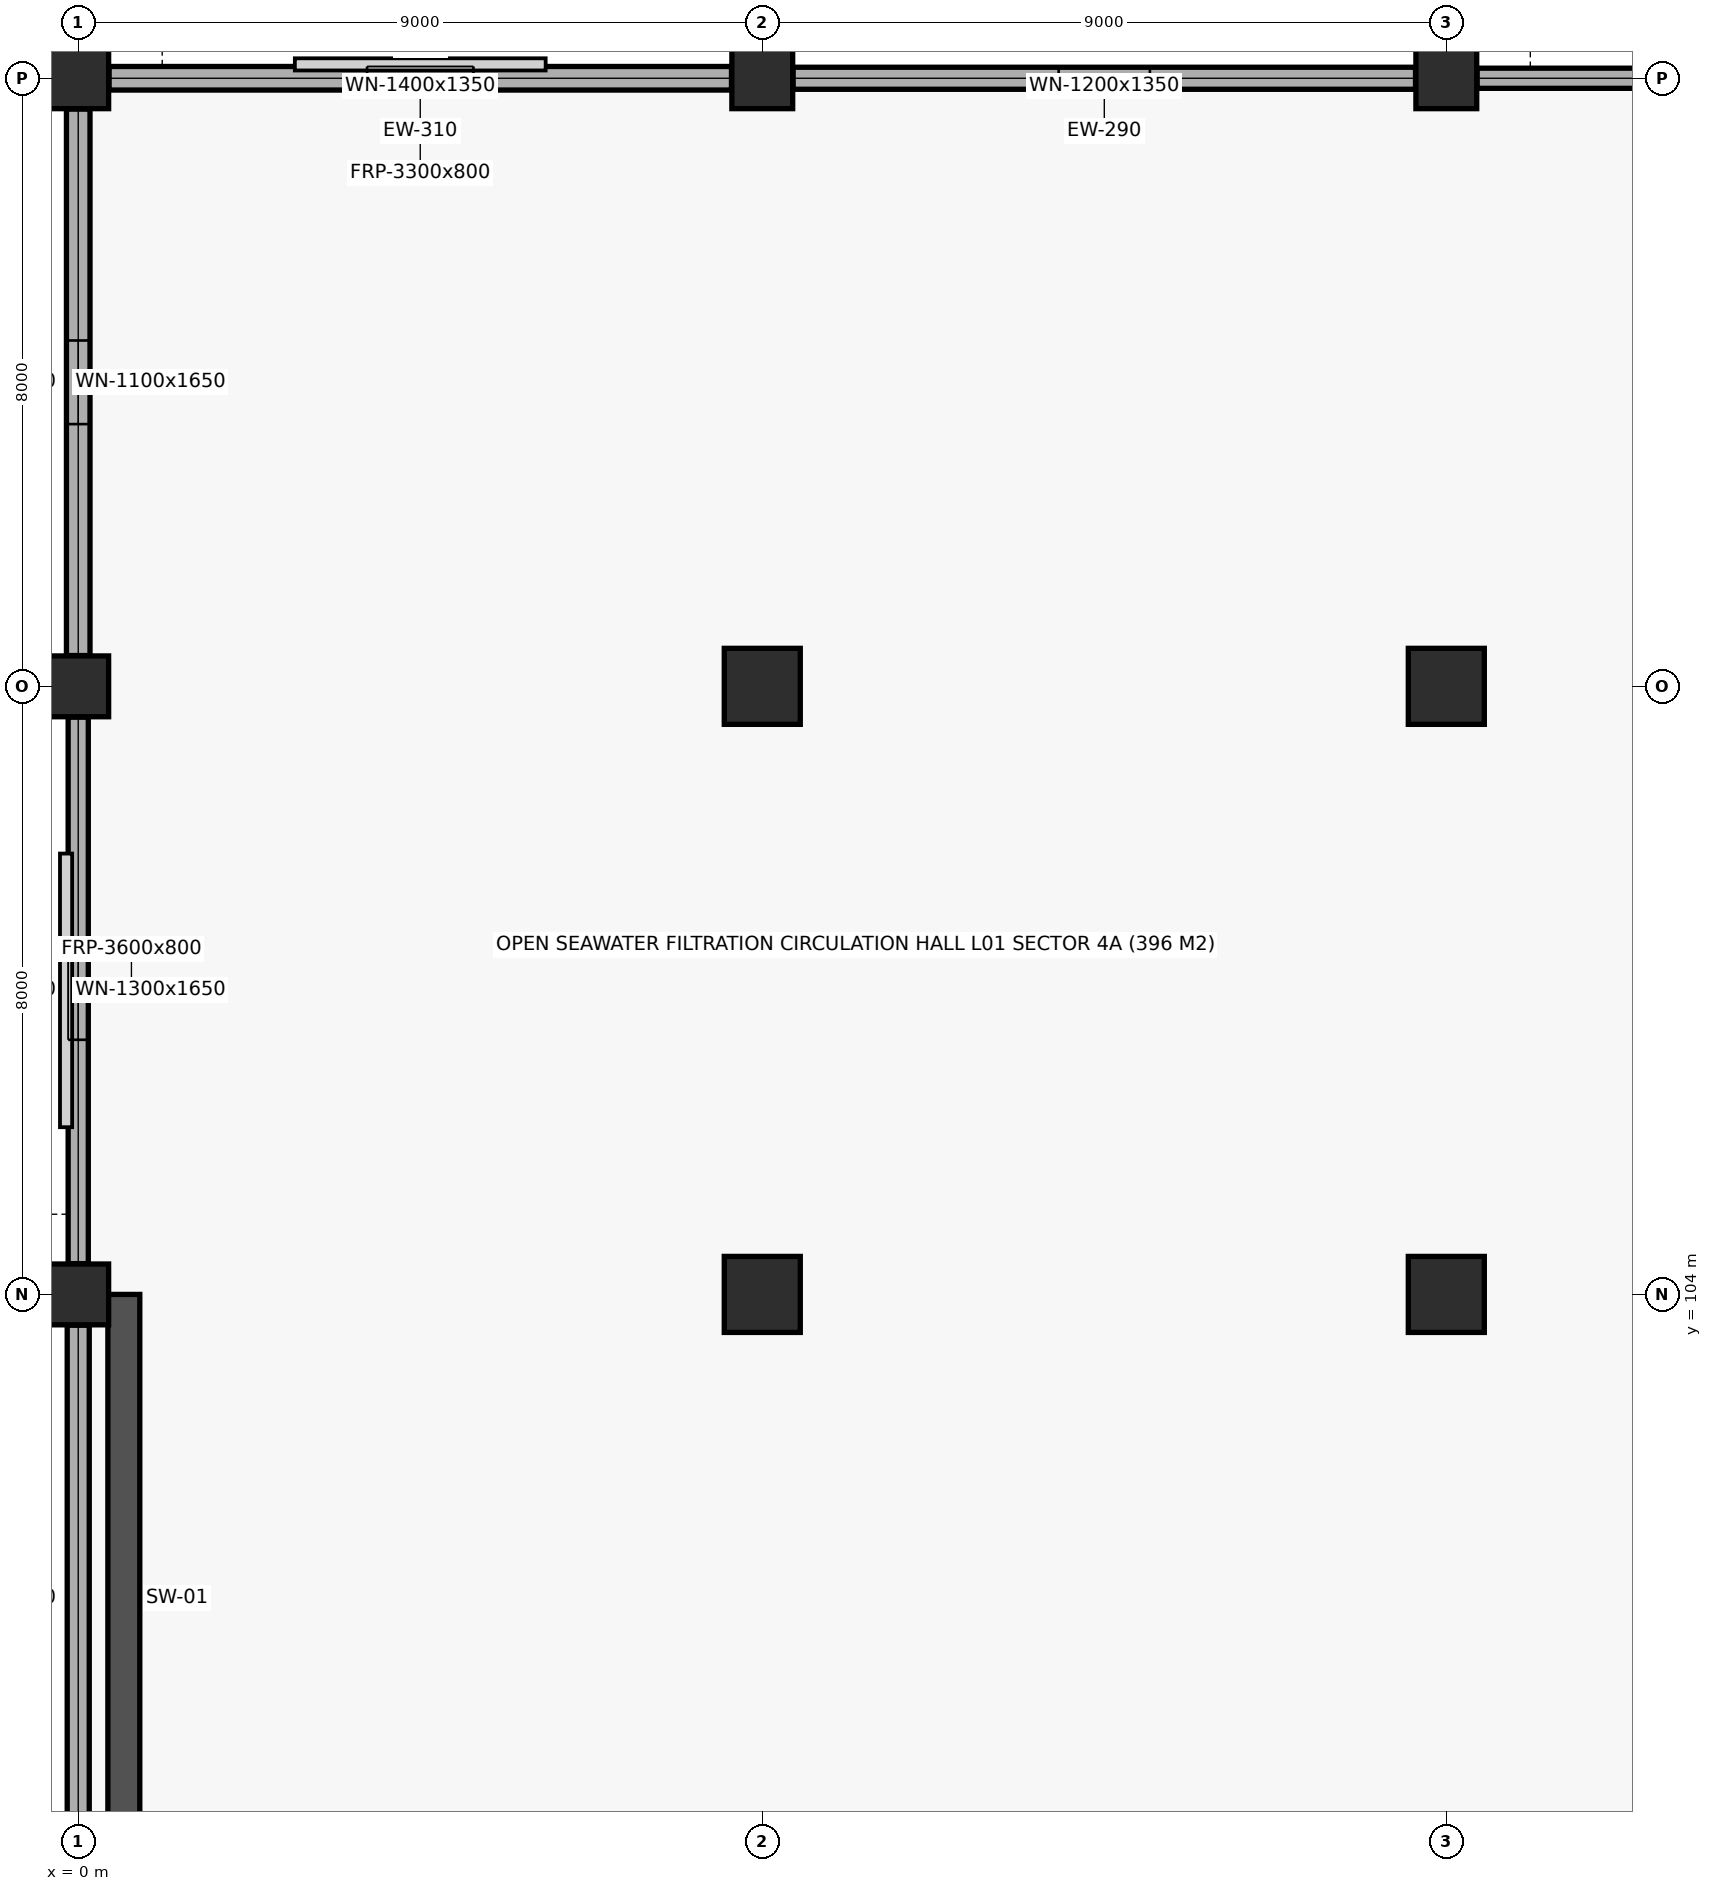
"""IFC4 building model, lengths in metres.
Left out: names, types, materials, properties, quantities, classifications, styles, units other than length and angle.
Written with IfcOpenShell. Run it as: python <this file> out.ifc"""

import sys

from ifc_helpers import new_model, si_unit, direction, frame, frame_2d, origin, origin_2d, place, context, subcontext, project, spatial, rectangle, extrude, element, fill, save


model = new_model("IFC4")
c1 = context("Model", 3, precision=1e-05, world=origin(), true_north=direction((0.0, 1.0)))
c2 = subcontext(c1, "Body", "Model", "MODEL_VIEW")
j1 = project(units=[si_unit("LENGTHUNIT", "METRE"), si_unit("PLANEANGLEUNIT", "RADIAN")], contexts=[c1])
p1 = place(None, origin())
s1 = spatial("IfcSite", under=j1, at=p1, CompositionType="ELEMENT")
p2 = place(p1, origin())
s2 = spatial("IfcBuilding", under=s1, at=p2, CompositionType="ELEMENT")
p3 = place(p2, frame((0.0, 0.0, 4.5)))
s3 = spatial("IfcBuildingStorey", under=s2, at=p3, CompositionType="ELEMENT", Elevation=4.5)
for number, where, z_axis, x_axis in (
    (1, (0.0, 104.0, 0.0), (0.0, 0.0, 1.0), (1.0, 0.0, 0.0)),
    (2, (0.0, 112.0, 0.0), (0.0, 0.0, 1.0), (1.0, 0.0, 0.0)),
    (3, (0.0, 120.0, 0.0), (0.0, 0.0, 1.0), (1.0, 0.0, 0.0)),
):
    element("IfcColumn", number, at=place(p3, frame(where, z_axis=z_axis, x_axis=x_axis)), inside=s3, PredefinedType="COLUMN", context=c2, shape_type="SweptSolid", body=[
        extrude(rectangle(XDim=0.8, YDim=0.8, at=origin_2d()), origin(), (0.0, 0.0, 1.0), 4.5),
    ])
for number, where, z_axis, x_axis in (
    (4, (9.0, 104.0, 0.0), (0.0, 0.0, 1.0), (1.0, 0.0, 0.0)),
    (5, (9.0, 112.0, 0.0), (0.0, 0.0, 1.0), (1.0, 0.0, 0.0)),
):
    element("IfcColumn", number, at=place(p3, frame(where, z_axis=z_axis, x_axis=x_axis)), inside=s3, PredefinedType="COLUMN", context=c2, shape_type="SweptSolid", body=[
        extrude(rectangle(XDim=1.0, YDim=1.0, at=origin_2d()), origin(), (0.0, 0.0, 1.0), 4.5),
    ])
p4 = place(p3, frame((9.0, 120.0, 0.0), z_axis=(0.0, 0.0, 1.0), x_axis=(1.0, 0.0, 0.0)))
e6 = element("IfcColumn", 6, at=p4, inside=s3, PredefinedType="COLUMN", context=c2, shape_type="SweptSolid", body=[
    extrude(rectangle(XDim=0.8, YDim=0.8, at=origin_2d()), origin(), (0.0, 0.0, 1.0), 4.5),
])
for number, where, z_axis, x_axis in (
    (7, (18.0, 104.0, 0.0), (0.0, 0.0, 1.0), (1.0, 0.0, 0.0)),
    (8, (18.0, 112.0, 0.0), (0.0, 0.0, 1.0), (1.0, 0.0, 0.0)),
):
    element("IfcColumn", number, at=place(p3, frame(where, z_axis=z_axis, x_axis=x_axis)), inside=s3, PredefinedType="COLUMN", context=c2, shape_type="SweptSolid", body=[
        extrude(rectangle(XDim=1.0, YDim=1.0, at=origin_2d()), origin(), (0.0, 0.0, 1.0), 4.5),
    ])
p5 = place(p3, frame((18.0, 120.0, 0.0), z_axis=(0.0, 0.0, 1.0), x_axis=(1.0, 0.0, 0.0)))
e9 = element("IfcColumn", 9, at=p5, inside=s3, PredefinedType="COLUMN", context=c2, shape_type="SweptSolid", body=[
    extrude(rectangle(XDim=0.8, YDim=0.8, at=origin_2d()), origin(), (0.0, 0.0, 1.0), 4.5),
])
p6 = place(p3, frame((0.6, 96.0, 0.0), z_axis=(0.0, 0.0, 1.0), x_axis=(0.0, 1.0, 0.0)))
e10 = element("IfcWall", 10, at=p6, inside=s3, PredefinedType="SHEAR", context=c2, shape_type="SweptSolid", body=[
    extrude(rectangle(XDim=8.0, YDim=0.42, at=frame_2d((4.0, 0.0))), origin(), (0.0, 0.0, 1.0), 4.18),
])
p7 = place(p3, frame((0.405, 120.0, 0.0), z_axis=(0.0, 0.0, 1.0), x_axis=(1.0, 0.0, 0.0)))
e11 = element("IfcWall", 11, at=p7, inside=s3, PredefinedType="STANDARD", context=c2, shape_type="SweptSolid", body=[
    extrude(rectangle(XDim=8.19, YDim=0.31, at=frame_2d((4.095, 0.0))), origin(), (0.0, 0.0, 1.0), 3.46),
])
p8 = place(p7, frame((3.395, 0.0, 0.85)))
e12 = element("IfcOpeningElement", 12, at=p8, cuts=e11, PredefinedType="OPENING", context=c2, shape_type="SweptSolid", body=[
    extrude(rectangle(XDim=1.4, YDim=1.35, at=frame_2d((0.7, 0.675))), frame((0.0, 0.167, 0.0), z_axis=(0.0, -1.0, 0.0), x_axis=(1.0, 0.0, 0.0)), (0.0, 0.0, 1.0), 0.334),
])
p9 = place(p3, frame((9.405, 120.0, 0.0), z_axis=(0.0, 0.0, 1.0), x_axis=(1.0, 0.0, 0.0)))
e13 = element("IfcWall", 13, at=p9, inside=s3, PredefinedType="STANDARD", context=c2, shape_type="SweptSolid", body=[
    extrude(rectangle(XDim=8.19, YDim=0.29, at=frame_2d((4.095, 0.0))), origin(), (0.0, 0.0, 1.0), 3.46),
])
p10 = place(p9, frame((3.495, 0.0, 0.85)))
e14 = element("IfcOpeningElement", 14, at=p10, cuts=e13, PredefinedType="OPENING", context=c2, shape_type="SweptSolid", body=[
    extrude(rectangle(XDim=1.2, YDim=1.35, at=frame_2d((0.6, 0.675))), frame((0.0, 0.157, 0.0), z_axis=(0.0, -1.0, 0.0), x_axis=(1.0, 0.0, 0.0)), (0.0, 0.0, 1.0), 0.314),
])
p11 = place(p3, frame((18.405, 120.0, 0.0), z_axis=(0.0, 0.0, 1.0), x_axis=(1.0, 0.0, 0.0)))
e15 = element("IfcWall", 15, at=p11, inside=s3, PredefinedType="STANDARD", context=c2, shape_type="SweptSolid", body=[
    extrude(rectangle(XDim=8.19, YDim=0.265, at=frame_2d((4.095, 0.0))), origin(), (0.0, 0.0, 1.0), 3.46),
])
p12 = place(p11, frame((3.595, 0.0, 0.85)))
e16 = element("IfcOpeningElement", 16, at=p12, cuts=e15, PredefinedType="OPENING", context=c2, shape_type="SweptSolid", body=[
    extrude(rectangle(XDim=1.0, YDim=1.35, at=frame_2d((0.5, 0.675))), frame((0.0, 0.145, 0.0), z_axis=(0.0, -1.0, 0.0), x_axis=(1.0, 0.0, 0.0)), (0.0, 0.0, 1.0), 0.289),
])
p13 = place(p3, frame((0.0, 96.405, 0.0), z_axis=(0.0, 0.0, 1.0), x_axis=(0.0, 1.0, 0.0)))
e17 = element("IfcWall", 17, at=p13, inside=s3, PredefinedType="STANDARD", context=c2, shape_type="SweptSolid", body=[
    extrude(rectangle(XDim=7.19, YDim=0.29, at=frame_2d((3.595, 0.0))), origin(), (0.0, 0.0, 1.0), 3.46),
])
p14 = place(p3, frame((0.0, 104.405, 0.0), z_axis=(0.0, 0.0, 1.0), x_axis=(0.0, 1.0, 0.0)))
e18 = element("IfcWall", 18, at=p14, inside=s3, PredefinedType="STANDARD", context=c2, shape_type="SweptSolid", body=[
    extrude(rectangle(XDim=7.19, YDim=0.265, at=frame_2d((3.595, 0.0))), origin(), (0.0, 0.0, 1.0), 3.46),
])
p15 = place(p14, frame((2.945, 0.0, 0.85)))
e19 = element("IfcOpeningElement", 19, at=p15, cuts=e18, PredefinedType="OPENING", context=c2, shape_type="SweptSolid", body=[
    extrude(rectangle(XDim=1.3, YDim=1.65, at=frame_2d((0.65, 0.825))), frame((0.0, 0.145, 0.0), z_axis=(0.0, -1.0, 0.0), x_axis=(1.0, 0.0, 0.0)), (0.0, 0.0, 1.0), 0.289),
])
p16 = place(p3, frame((0.0, 112.405, 0.0), z_axis=(0.0, 0.0, 1.0), x_axis=(0.0, 1.0, 0.0)))
e20 = element("IfcWall", 20, at=p16, inside=s3, PredefinedType="STANDARD", context=c2, shape_type="SweptSolid", body=[
    extrude(rectangle(XDim=7.19, YDim=0.31, at=frame_2d((3.595, 0.0))), origin(), (0.0, 0.0, 1.0), 3.46),
])
p17 = place(p16, frame((3.045, 0.0, 0.85)))
e21 = element("IfcOpeningElement", 21, at=p17, cuts=e20, PredefinedType="OPENING", context=c2, shape_type="SweptSolid", body=[
    extrude(rectangle(XDim=1.1, YDim=1.65, at=frame_2d((0.55, 0.825))), frame((0.0, 0.167, 0.0), z_axis=(0.0, -1.0, 0.0), x_axis=(1.0, 0.0, 0.0)), (0.0, 0.0, 1.0), 0.334),
])
p18 = place(p8, origin())
e22 = element("IfcWindow", 22, at=p18, inside=s3, PartitioningType="SINGLE_PANEL", PredefinedType="WINDOW", context=c2, shape_type="SweptSolid", body=[
    extrude(rectangle(XDim=1.4, YDim=1.35, at=frame_2d((0.7, 0.675))), frame((0.0, 0.03, 0.0), z_axis=(0.0, -1.0, 0.0), x_axis=(1.0, 0.0, 0.0)), (0.0, 0.0, 1.0), 0.06),
])
fill(e12, e22)
p19 = place(p10, origin())
e23 = element("IfcWindow", 23, at=p19, inside=s3, PartitioningType="SINGLE_PANEL", PredefinedType="WINDOW", context=c2, shape_type="SweptSolid", body=[
    extrude(rectangle(XDim=1.2, YDim=1.35, at=frame_2d((0.6, 0.675))), frame((0.0, 0.03, 0.0), z_axis=(0.0, -1.0, 0.0), x_axis=(1.0, 0.0, 0.0)), (0.0, 0.0, 1.0), 0.06),
])
fill(e14, e23)
p20 = place(p15, origin())
e24 = element("IfcWindow", 24, at=p20, inside=s3, PartitioningType="SINGLE_PANEL", PredefinedType="WINDOW", context=c2, shape_type="SweptSolid", body=[
    extrude(rectangle(XDim=1.3, YDim=1.65, at=frame_2d((0.65, 0.825))), frame((0.0, 0.03, 0.0), z_axis=(0.0, -1.0, 0.0), x_axis=(1.0, 0.0, 0.0)), (0.0, 0.0, 1.0), 0.06),
])
fill(e19, e24)
p21 = place(p17, origin())
e25 = element("IfcWindow", 25, at=p21, inside=s3, PartitioningType="SINGLE_PANEL", PredefinedType="WINDOW", context=c2, shape_type="SweptSolid", body=[
    extrude(rectangle(XDim=1.1, YDim=1.65, at=frame_2d((0.55, 0.825))), frame((0.0, 0.03, 0.0), z_axis=(0.0, -1.0, 0.0), x_axis=(1.0, 0.0, 0.0)), (0.0, 0.0, 1.0), 0.06),
])
fill(e21, e25)
save(model, sys.argv[1])
